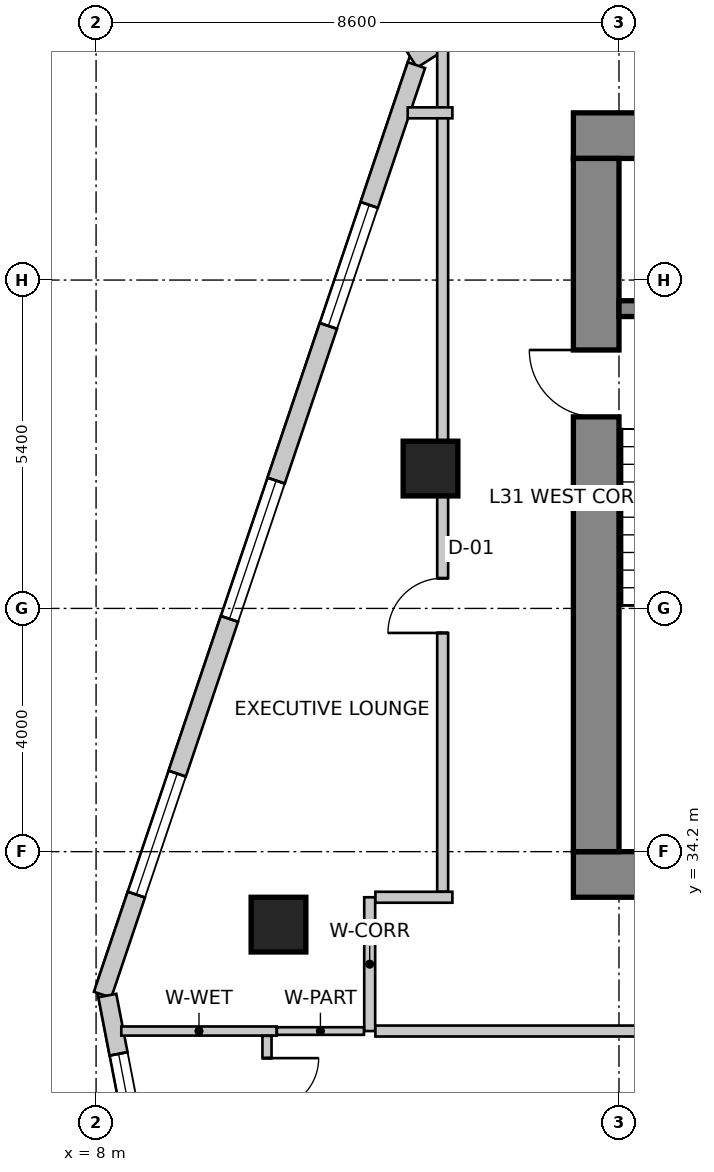
"""IFC4 building model, lengths in metres.
Left out: names, types, materials, properties, quantities, classifications, styles, units other than length and angle.
Written with IfcOpenShell. Run it as: python <this file> out.ifc"""

import sys

from ifc_helpers import new_model, si_unit, direction, frame, frame_2d, origin, origin_2d, place, context, subcontext, project, spatial, rectangle, extrude, source, transform, mapped, element, fill, save


model = new_model("IFC4")
c1 = context("Model", 3, precision=1e-05, world=origin(), true_north=direction((0.0, 1.0)))
c2 = subcontext(c1, "Body", "Model", "MODEL_VIEW")
j1 = project(units=[si_unit("LENGTHUNIT", "METRE"), si_unit("PLANEANGLEUNIT", "RADIAN")], contexts=[c1])
p1 = place(None, origin())
s1 = spatial("IfcSite", under=j1, at=p1, CompositionType="ELEMENT")
p2 = place(p1, origin())
s2 = spatial("IfcBuilding", under=s1, at=p2, CompositionType="ELEMENT")
p3 = place(p2, frame((0.0, 0.0, 128.6)))
s3 = spatial("IfcBuildingStorey", under=s2, at=p3, CompositionType="ELEMENT", Elevation=128.6)
p4 = place(p3, frame((15.85, 45.975, 0.0), z_axis=(0.0, 0.0, 1.0), x_axis=(1.0, 0.0, 0.0)))
e1 = element("IfcWall", 1, at=p4, inside=s3, PredefinedType="SHEAR", context=c2, shape_type="SweptSolid", body=[
    extrude(rectangle(XDim=15.9, YDim=0.75, at=frame_2d((7.95, 0.0))), origin(), (0.0, 0.0, 1.0), 3.6),
])
p5 = place(p3, frame((15.85, 33.825, 0.0), z_axis=(0.0, 0.0, 1.0), x_axis=(1.0, 0.0, 0.0)))
e2 = element("IfcWall", 2, at=p5, inside=s3, PredefinedType="SHEAR", context=c2, shape_type="SweptSolid", body=[
    extrude(rectangle(XDim=15.9, YDim=0.75, at=frame_2d((7.95, 0.0))), origin(), (0.0, 0.0, 1.0), 3.6),
])
m1 = source(origin(), c2, "Body", "SweptSolid", [
    extrude(rectangle(XDim=1.3, YDim=2.15, at=frame_2d((0.65, 1.075))), frame((0.0, 0.385, 0.0), z_axis=(0.0, -1.0, 0.0), x_axis=(1.0, 0.0, 0.0)), (0.0, 0.0, 1.0), 0.77),
])
p6 = place(p5, frame((10.08, 0.0, 0.0)))
e3 = element("IfcOpeningElement", 3, at=p6, cuts=e2, PredefinedType="OPENING", context=c2, shape_type="MappedRepresentation", body=[
    mapped(m1, transform((0.0, 0.0, 0.0), scale=1.0)),
])
p7 = place(p3, frame((16.225, 34.2, 0.0), z_axis=(0.0, 0.0, 1.0), x_axis=(0.0, 1.0, 0.0)))
e4 = element("IfcWall", 4, at=p7, inside=s3, PredefinedType="SHEAR", context=c2, shape_type="SweptSolid", body=[
    extrude(rectangle(XDim=11.4, YDim=0.75, at=frame_2d((5.7, 0.0))), origin(), (0.0, 0.0, 1.0), 3.6),
])
m2 = source(origin(), c2, "Body", "SweptSolid", [
    extrude(rectangle(XDim=1.1, YDim=2.15, at=frame_2d((0.55, 1.075))), frame((0.0, 0.385, 0.0), z_axis=(0.0, -1.0, 0.0), x_axis=(1.0, 0.0, 0.0)), (0.0, 0.0, 1.0), 0.77),
])
p8 = place(p7, frame((7.15, 0.0, 0.0)))
e5 = element("IfcOpeningElement", 5, at=p8, cuts=e4, PredefinedType="OPENING", context=c2, shape_type="MappedRepresentation", body=[
    mapped(m2, transform((0.0, 0.0, 0.0), scale=1.0)),
])
p9 = place(p3, frame((16.6, 43.13, 0.0), z_axis=(0.0, 0.0, 1.0), x_axis=(1.0, 0.0, 0.0)))
e6 = element("IfcWall", 6, at=p9, inside=s3, PredefinedType="SHEAR", context=c2, shape_type="SweptSolid", body=[
    extrude(rectangle(XDim=3.5, YDim=0.26, at=frame_2d((1.75, 0.0))), origin(), (0.0, 0.0, 1.0), 3.6),
])
m3 = source(origin(), c2, "Body", "SweptSolid", [
    extrude(rectangle(XDim=0.9, YDim=0.9, at=origin_2d()), origin(), (0.0, 0.0, 1.0), 3.6),
])
for number, where, z_axis, x_axis in (
    (7, (11.0, 33.0, 0.0), (0.0, 0.0, 1.0), (1.0, 0.0, 0.0)),
    (8, (13.5, 40.5, 0.0), (0.0, 0.0, 1.0), (1.0, 0.0, 0.0)),
):
    element("IfcColumn", number, at=place(p3, frame(where, z_axis=z_axis, x_axis=x_axis)), inside=s3, PredefinedType="COLUMN", context=c2, shape_type="MappedRepresentation", body=[
        mapped(m3, transform((0.0, 0.0, 0.0), scale=1.0)),
    ])
p10 = place(p3, frame((21.875, 52.742, 0.0), z_axis=(0.0, 0.0, 1.0), x_axis=(-0.843662465249, -0.536873956092, 0.0)))
e9 = element("IfcWall", 9, at=p10, inside=s3, PredefinedType="SOLIDWALL", context=c2, shape_type="SweptSolid", body=[
    extrude(rectangle(XDim=10.284, YDim=0.3, at=frame_2d((5.142, 0.0))), origin(), (0.0, 0.0, 1.0), 3.35),
])
m4 = source(origin(), c2, "Body", "SweptSolid", [
    extrude(rectangle(XDim=2.4, YDim=2.2, at=frame_2d((1.2, 1.1))), frame((0.0, 0.16, 0.0), z_axis=(0.0, -1.0, 0.0), x_axis=(1.0, 0.0, 0.0)), (0.0, 0.0, 1.0), 0.32),
])
p11 = place(p10, frame((2.656, 0.0, 0.85)))
e10 = element("IfcOpeningElement", 10, at=p11, cuts=e9, PredefinedType="OPENING", context=c2, shape_type="MappedRepresentation", body=[
    mapped(m4, transform((0.0, 0.0, 0.0), scale=1.0)),
])
m5 = source(origin(), c2, "Body", "SweptSolid", [
    extrude(rectangle(XDim=1.5, YDim=1.8, at=frame_2d((0.75, 0.9))), frame((0.0, 0.16, 0.0), z_axis=(0.0, -1.0, 0.0), x_axis=(1.0, 0.0, 0.0)), (0.0, 0.0, 1.0), 0.32),
])
p12 = place(p10, frame((7.937, 0.0, 0.85)))
e11 = element("IfcOpeningElement", 11, at=p12, cuts=e9, PredefinedType="OPENING", context=c2, shape_type="MappedRepresentation", body=[
    mapped(m5, transform((0.0, 0.0, 0.0), scale=1.0)),
])
p13 = place(p3, frame((13.269, 47.134, 0.0), z_axis=(0.0, 0.0, 1.0), x_axis=(-0.319929596295, -0.947441319246, 0.0)))
e12 = element("IfcWall", 12, at=p13, inside=s3, PredefinedType="SOLIDWALL", context=c2, shape_type="SweptSolid", body=[
    extrude(rectangle(XDim=16.134, YDim=0.3, at=frame_2d((8.067, 0.0))), origin(), (0.0, 0.0, 1.0), 3.35),
])
m6 = source(origin(), c2, "Body", "SweptSolid", [
    extrude(rectangle(XDim=2.1, YDim=2.0, at=frame_2d((1.05, 1.0))), frame((0.0, 0.16, 0.0), z_axis=(0.0, -1.0, 0.0), x_axis=(1.0, 0.0, 0.0)), (0.0, 0.0, 1.0), 0.32),
])
p14 = place(p13, frame((2.426, 0.0, 0.85)))
e13 = element("IfcOpeningElement", 13, at=p14, cuts=e12, PredefinedType="OPENING", context=c2, shape_type="MappedRepresentation", body=[
    mapped(m6, transform((0.0, 0.0, 0.0), scale=1.0)),
])
p15 = place(p13, frame((7.211, 0.0, 0.85)))
e14 = element("IfcOpeningElement", 14, at=p15, cuts=e12, PredefinedType="OPENING", context=c2, shape_type="MappedRepresentation", body=[
    mapped(m4, transform((0.0, 0.0, 0.0), scale=1.0)),
])
p16 = place(p13, frame((12.297, 0.0, 0.85)))
e15 = element("IfcOpeningElement", 15, at=p16, cuts=e12, PredefinedType="OPENING", context=c2, shape_type="MappedRepresentation", body=[
    mapped(m6, transform((0.0, 0.0, 0.0), scale=1.0)),
])
p17 = place(p3, frame((8.185, 31.834, 0.0), z_axis=(0.0, 0.0, 1.0), x_axis=(0.189707113148, -0.981840725994, 0.0)))
e16 = element("IfcWall", 16, at=p17, inside=s3, PredefinedType="SOLIDWALL", context=c2, shape_type="SweptSolid", body=[
    extrude(rectangle(XDim=21.221, YDim=0.3, at=frame_2d((10.611, 0.0))), origin(), (0.0, 0.0, 1.0), 3.35),
])
p18 = place(p17, frame((0.977, 0.0, 0.85)))
e17 = element("IfcOpeningElement", 17, at=p18, cuts=e16, PredefinedType="OPENING", context=c2, shape_type="MappedRepresentation", body=[
    mapped(m5, transform((0.0, 0.0, 0.0), scale=1.0)),
])
p19 = place(p17, frame((4.219, 0.0, 0.85)))
e18 = element("IfcOpeningElement", 18, at=p19, cuts=e16, PredefinedType="OPENING", context=c2, shape_type="MappedRepresentation", body=[
    mapped(m4, transform((0.0, 0.0, 0.0), scale=1.0)),
])
p20 = place(p17, frame((8.259, 0.0, 0.85)))
e19 = element("IfcOpeningElement", 19, at=p20, cuts=e16, PredefinedType="OPENING", context=c2, shape_type="MappedRepresentation", body=[
    mapped(m5, transform((0.0, 0.0, 0.0), scale=1.0)),
])
m7 = source(origin(), c2, "Body", "SweptSolid", [
    extrude(rectangle(XDim=1.8, YDim=2.1, at=frame_2d((0.9, 1.05))), frame((0.0, 0.16, 0.0), z_axis=(0.0, -1.0, 0.0), x_axis=(1.0, 0.0, 0.0)), (0.0, 0.0, 1.0), 0.32),
])
p21 = place(p17, frame((10.401, 0.0, 0.85)))
e20 = element("IfcOpeningElement", 20, at=p21, cuts=e16, PredefinedType="OPENING", context=c2, shape_type="MappedRepresentation", body=[
    mapped(m7, transform((0.0, 0.0, 0.0), scale=1.0)),
])
p22 = place(p17, frame((12.842, 0.0, 0.85)))
e21 = element("IfcOpeningElement", 21, at=p22, cuts=e16, PredefinedType="OPENING", context=c2, shape_type="MappedRepresentation", body=[
    mapped(m5, transform((0.0, 0.0, 0.0), scale=1.0)),
])
p23 = place(p17, frame((16.661, 0.0, 0.85)))
e22 = element("IfcOpeningElement", 22, at=p23, cuts=e16, PredefinedType="OPENING", context=c2, shape_type="MappedRepresentation", body=[
    mapped(m4, transform((0.0, 0.0, 0.0), scale=1.0)),
])
p24 = place(p3, frame((12.5, 31.25, 0.0), z_axis=(0.0, 0.0, 1.0), x_axis=(0.0, 1.0, 0.0)))
e23 = element("IfcWall", 23, at=p24, inside=s3, PredefinedType="PARTITIONING", context=c2, shape_type="SweptSolid", body=[
    extrude(rectangle(XDim=2.2, YDim=0.18, at=frame_2d((1.1, 0.0))), origin(), (0.0, 0.0, 1.0), 3.019),
])
p25 = place(p3, frame((12.594, 33.45, 0.0), z_axis=(0.0, 0.0, 1.0), x_axis=(1.0, 0.0, 0.0)))
e24 = element("IfcWall", 24, at=p25, inside=s3, PredefinedType="PARTITIONING", context=c2, shape_type="SweptSolid", body=[
    extrude(rectangle(XDim=1.266, YDim=0.18, at=frame_2d((0.633, 0.0))), origin(), (0.0, 0.0, 1.0), 3.35),
])
p26 = place(p3, frame((17.96, 31.25, 0.0), z_axis=(0.0, 0.0, 1.0), x_axis=(-1.0, 0.0, 0.0)))
e25 = element("IfcWall", 25, at=p26, inside=s3, PredefinedType="PARTITIONING", context=c2, shape_type="SweptSolid", body=[
    extrude(rectangle(XDim=5.366, YDim=0.18, at=frame_2d((2.683, 0.0))), origin(), (0.0, 0.0, 1.0), 3.019),
])
p27 = place(p3, frame((13.7, 33.544, 0.0), z_axis=(0.0, 0.0, 1.0), x_axis=(0.0, 1.0, 0.0)))
e26 = element("IfcWall", 26, at=p27, inside=s3, PredefinedType="PARTITIONING", context=c2, shape_type="SweptSolid", body=[
    extrude(rectangle(XDim=13.86, YDim=0.18, at=frame_2d((6.93, 0.0))), origin(), (0.0, 0.0, 1.0), 2.492),
])
m8 = source(origin(), c2, "Body", "SweptSolid", [
    extrude(rectangle(XDim=0.9, YDim=2.15, at=frame_2d((0.45, 1.075))), frame((0.0, 0.1, 0.0), z_axis=(0.0, -1.0, 0.0), x_axis=(1.0, 0.0, 0.0)), (0.0, 0.0, 1.0), 0.2),
])
p28 = place(p27, frame((4.253, 0.0, 0.0)))
e27 = element("IfcOpeningElement", 27, at=p28, cuts=e26, PredefinedType="OPENING", context=c2, shape_type="MappedRepresentation", body=[
    mapped(m8, transform((0.0, 0.0, 0.0), scale=1.0)),
])
p29 = place(p3, frame((13.86, 46.35, 0.0), z_axis=(0.0, 0.0, 1.0), x_axis=(-1.0, 0.0, 0.0)))
e28 = element("IfcWall", 28, at=p29, inside=s3, PredefinedType="PARTITIONING", context=c2, shape_type="SweptSolid", body=[
    extrude(rectangle(XDim=0.735, YDim=0.18, at=frame_2d((0.367, 0.0))), origin(), (0.0, 0.0, 1.0), 3.35),
])
p30 = place(p3, frame((10.971, 31.25, 0.0), z_axis=(0.0, 0.0, 1.0), x_axis=(-1.0, 0.0, 0.0)))
e29 = element("IfcWall", 29, at=p30, inside=s3, PredefinedType="PARTITIONING", context=c2, shape_type="SweptSolid", body=[
    extrude(rectangle(XDim=2.556, YDim=0.15, at=frame_2d((1.278, 0.0))), origin(), (0.0, 0.0, 1.0), 2.492),
])
p31 = place(p3, frame((12.406, 31.25, 0.0), z_axis=(0.0, 0.0, 1.0), x_axis=(-1.0, 0.0, 0.0)))
e30 = element("IfcWall", 30, at=p31, inside=s3, PredefinedType="PARTITIONING", context=c2, shape_type="SweptSolid", body=[
    extrude(rectangle(XDim=1.433, YDim=0.125, at=frame_2d((0.717, 0.0))), origin(), (0.0, 0.0, 1.0), 2.492),
])
p32 = place(p3, frame((10.811, 31.171, 0.0), z_axis=(0.0, 0.0, 1.0), x_axis=(0.0, -1.0, 0.0)))
e31 = element("IfcWall", 31, at=p32, inside=s3, PredefinedType="PARTITIONING", context=c2, shape_type="SweptSolid", body=[
    extrude(rectangle(XDim=2.101, YDim=0.15, at=frame_2d((1.05, 0.0))), origin(), (0.0, 0.0, 1.0), 2.492),
])
m9 = source(origin(), c2, "Body", "SweptSolid", [
    extrude(rectangle(XDim=0.85, YDim=2.15, at=frame_2d((0.425, 1.075))), frame((0.0, 0.085, 0.0), z_axis=(0.0, -1.0, 0.0), x_axis=(1.0, 0.0, 0.0)), (0.0, 0.0, 1.0), 0.17),
])
p33 = place(p32, frame((0.366, 0.0, 0.0)))
e32 = element("IfcOpeningElement", 32, at=p33, cuts=e31, PredefinedType="OPENING", context=c2, shape_type="MappedRepresentation", body=[
    mapped(m9, transform((0.0, 0.0, 0.0), scale=1.0)),
])
m10 = source(origin(), c2, "Body", "SweptSolid", [
    extrude(rectangle(XDim=2.1, YDim=2.0, at=frame_2d((1.05, 1.0))), frame((0.0, -0.015, 0.0), z_axis=(0.0, -1.0, 0.0), x_axis=(1.0, 0.0, 0.0)), (0.0, 0.0, 1.0), 0.06),
])
p34 = place(p14, origin())
e33 = element("IfcWindow", 33, at=p34, inside=s3, PartitioningType="SINGLE_PANEL", PredefinedType="WINDOW", context=c2, shape_type="MappedRepresentation", body=[
    mapped(m10, transform((0.0, 0.0, 0.0), scale=1.0)),
])
fill(e13, e33)
m11 = source(origin(), c2, "Body", "SweptSolid", [
    extrude(rectangle(XDim=2.4, YDim=2.2, at=frame_2d((1.2, 1.1))), frame((0.0, -0.015, 0.0), z_axis=(0.0, -1.0, 0.0), x_axis=(1.0, 0.0, 0.0)), (0.0, 0.0, 1.0), 0.06),
])
p35 = place(p15, origin())
e34 = element("IfcWindow", 34, at=p35, inside=s3, PartitioningType="SINGLE_PANEL", PredefinedType="WINDOW", context=c2, shape_type="MappedRepresentation", body=[
    mapped(m11, transform((0.0, 0.0, 0.0), scale=1.0)),
])
fill(e14, e34)
p36 = place(p16, origin())
e35 = element("IfcWindow", 35, at=p36, inside=s3, PartitioningType="SINGLE_PANEL", PredefinedType="WINDOW", context=c2, shape_type="MappedRepresentation", body=[
    mapped(m10, transform((0.0, 0.0, 0.0), scale=1.0)),
])
fill(e15, e35)
m12 = source(origin(), c2, "Body", "SweptSolid", [
    extrude(rectangle(XDim=1.5, YDim=1.8, at=frame_2d((0.75, 0.9))), frame((0.0, -0.015, 0.0), z_axis=(0.0, -1.0, 0.0), x_axis=(1.0, 0.0, 0.0)), (0.0, 0.0, 1.0), 0.06),
])
p37 = place(p18, origin())
e36 = element("IfcWindow", 36, at=p37, inside=s3, PartitioningType="SINGLE_PANEL", PredefinedType="WINDOW", context=c2, shape_type="MappedRepresentation", body=[
    mapped(m12, transform((0.0, 0.0, 0.0), scale=1.0)),
])
fill(e17, e36)
m13 = source(origin(), c2, "Body", "SweptSolid", [
    extrude(rectangle(XDim=1.1, YDim=2.15, at=frame_2d((0.55, 1.075))), frame((0.0, 0.025, 0.0), z_axis=(0.0, -1.0, 0.0), x_axis=(1.0, 0.0, 0.0)), (0.0, 0.0, 1.0), 0.05),
])
p38 = place(p8, origin())
e37 = element("IfcDoor", 37, at=p38, inside=s3, OperationType="SINGLE_SWING_RIGHT", PredefinedType="DOOR", context=c2, shape_type="MappedRepresentation", body=[
    mapped(m13, transform((0.0, 0.0, 0.0), scale=1.0)),
])
fill(e5, e37)
m14 = source(origin(), c2, "Body", "SweptSolid", [
    extrude(rectangle(XDim=0.9, YDim=2.15, at=frame_2d((0.45, 1.075))), frame((0.0, 0.025, 0.0), z_axis=(0.0, -1.0, 0.0), x_axis=(1.0, 0.0, 0.0)), (0.0, 0.0, 1.0), 0.05),
])
p39 = place(p28, origin())
e38 = element("IfcDoor", 38, at=p39, inside=s3, OperationType="SINGLE_SWING_LEFT", PredefinedType="DOOR", context=c2, shape_type="MappedRepresentation", body=[
    mapped(m14, transform((0.0, 0.0, 0.0), scale=1.0)),
])
fill(e27, e38)
m15 = source(origin(), c2, "Body", "SweptSolid", [
    extrude(rectangle(XDim=0.85, YDim=2.15, at=frame_2d((0.425, 1.075))), frame((0.0, 0.025, 0.0), z_axis=(0.0, -1.0, 0.0), x_axis=(1.0, 0.0, 0.0)), (0.0, 0.0, 1.0), 0.05),
])
p40 = place(p33, origin())
e39 = element("IfcDoor", 39, at=p40, inside=s3, OperationType="SINGLE_SWING_LEFT", PredefinedType="DOOR", context=c2, shape_type="MappedRepresentation", body=[
    mapped(m15, transform((0.0, 0.0, 0.0), scale=1.0)),
])
fill(e32, e39)
save(model, sys.argv[1])
